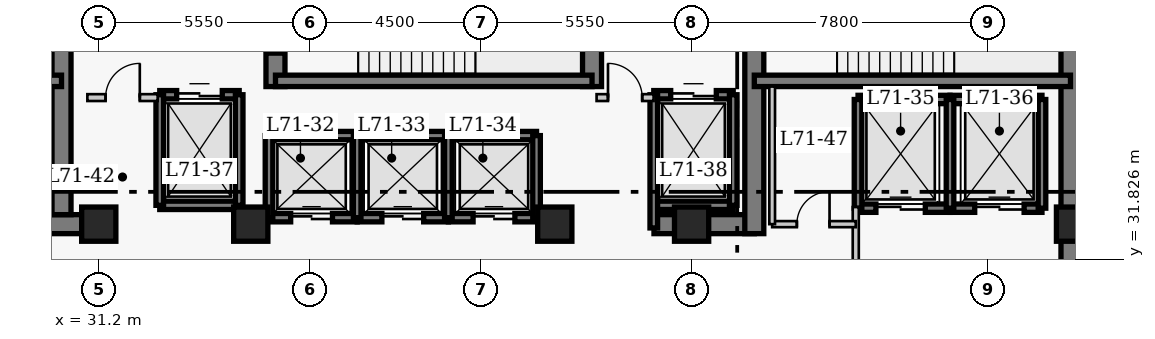
"""IFC4 building model, lengths in metres.
Left out: names, types, materials, properties, quantities, classifications, styles, units other than length and angle.
Written with IfcOpenShell. Run it as: python <this file> out.ifc"""

import sys

from ifc_helpers import new_model, si_unit, direction, frame, frame_2d, origin, origin_2d, place, context, subcontext, project, spatial, rectangle, extrude, element, fill, save


model = new_model("IFC4")
c1 = context("Model", 3, precision=1e-05, world=origin(), true_north=direction((0.0, 1.0)))
c2 = subcontext(c1, "Body", "Model", "MODEL_VIEW")
j1 = project(units=[si_unit("LENGTHUNIT", "METRE"), si_unit("PLANEANGLEUNIT", "RADIAN")], contexts=[c1])
p1 = place(None, origin())
s1 = spatial("IfcSite", under=j1, at=p1, CompositionType="ELEMENT")
p2 = place(p1, origin())
s2 = spatial("IfcBuilding", under=s1, at=p2, CompositionType="ELEMENT")
p3 = place(p2, frame((0.0, 0.0, 285.4)))
s3 = spatial("IfcBuildingStorey", under=s2, at=p3, CompositionType="ELEMENT", Elevation=285.4)
p4 = place(p3, frame((56.77, 27.05, 0.0), z_axis=(0.0, 0.0, 1.0), x_axis=(0.0, 1.0, 0.0)))
e1 = element("IfcWall", 1, at=p4, inside=s3, PredefinedType="SHEAR", context=c2, shape_type="SweptSolid", body=[
    extrude(rectangle(XDim=13.52, YDim=0.5, at=frame_2d((6.76, 0.0))), origin(), (0.0, 0.0, 1.0), 4.0),
])
p5 = place(p3, frame((28.45, 32.75, 0.0), z_axis=(0.0, 0.0, 1.0), x_axis=(1.0, 0.0, 0.0)))
e2 = element("IfcWall", 2, at=p5, inside=s3, PredefinedType="SHEAR", context=c2, shape_type="SweptSolid", body=[
    extrude(rectangle(XDim=2.4, YDim=0.5, at=frame_2d((1.2, 0.0))), origin(), (0.0, 0.0, 1.0), 4.0),
])
p6 = place(p3, frame((45.81, 32.75, 0.0), z_axis=(0.0, 0.0, 1.0), x_axis=(1.0, 0.0, 0.0)))
e3 = element("IfcWall", 3, at=p6, inside=s3, PredefinedType="SHEAR", context=c2, shape_type="SweptSolid", body=[
    extrude(rectangle(XDim=2.64, YDim=0.5, at=frame_2d((1.32, 0.0))), origin(), (0.0, 0.0, 1.0), 4.0),
])
p7 = place(p3, frame((30.22, 33.0, 0.0), z_axis=(0.0, 0.0, 1.0), x_axis=(0.0, 1.0, 0.0)))
e4 = element("IfcWall", 4, at=p7, inside=s3, PredefinedType="SHEAR", context=c2, shape_type="SweptSolid", body=[
    extrude(rectangle(XDim=7.32, YDim=0.5, at=frame_2d((3.66, 0.0))), origin(), (0.0, 0.0, 1.0), 4.0),
])
p8 = place(p3, frame((35.85, 36.37, 0.0), z_axis=(0.0, 0.0, 1.0), x_axis=(0.0, 1.0, 0.0)))
e5 = element("IfcWall", 5, at=p8, inside=s3, PredefinedType="SHEAR", context=c2, shape_type="SweptSolid", body=[
    extrude(rectangle(XDim=3.95, YDim=0.5, at=frame_2d((1.975, 0.0))), origin(), (0.0, 0.0, 1.0), 4.0),
])
p9 = place(p8, frame((0.88, 0.0, 0.0)))
e6 = element("IfcOpeningElement", 6, at=p9, cuts=e5, PredefinedType="OPENING", context=c2, shape_type="SweptSolid", body=[
    extrude(rectangle(XDim=1.1, YDim=2.15, at=frame_2d((0.55, 1.075))), frame((0.0, 0.26, 0.0), z_axis=(0.0, -1.0, 0.0), x_axis=(1.0, 0.0, 0.0)), (0.0, 0.0, 1.0), 0.52),
])
p10 = place(p3, frame((44.18, 36.37, 0.0), z_axis=(0.0, 0.0, 1.0), x_axis=(0.0, 1.0, 0.0)))
e7 = element("IfcWall", 7, at=p10, inside=s3, PredefinedType="SHEAR", context=c2, shape_type="SweptSolid", body=[
    extrude(rectangle(XDim=3.95, YDim=0.5, at=frame_2d((1.975, 0.0))), origin(), (0.0, 0.0, 1.0), 4.0),
])
p11 = place(p3, frame((48.45, 32.5, 0.0), z_axis=(0.0, 0.0, 1.0), x_axis=(0.0, 1.0, 0.0)))
e8 = element("IfcWall", 8, at=p11, inside=s3, PredefinedType="SHEAR", context=c2, shape_type="SweptSolid", body=[
    extrude(rectangle(XDim=7.82, YDim=0.5, at=frame_2d((3.91, 0.0))), origin(), (0.0, 0.0, 1.0), 4.0),
])
p12 = place(p11, frame((5.7, 0.0, 0.0)))
e9 = element("IfcOpeningElement", 9, at=p12, cuts=e8, PredefinedType="OPENING", context=c2, shape_type="SweptSolid", body=[
    extrude(rectangle(XDim=1.1, YDim=2.15, at=frame_2d((0.55, 1.075))), frame((0.0, 0.26, 0.0), z_axis=(0.0, -1.0, 0.0), x_axis=(1.0, 0.0, 0.0)), (0.0, 0.0, 1.0), 0.52),
])
p13 = place(p3, frame((21.9, 36.52, 0.0), z_axis=(0.0, 0.0, 1.0), x_axis=(1.0, 0.0, 0.0)))
e10 = element("IfcWall", 10, at=p13, inside=s3, PredefinedType="SHEAR", context=c2, shape_type="SweptSolid", body=[
    extrude(rectangle(XDim=8.32, YDim=0.3, at=frame_2d((4.16, 0.0))), origin(), (0.0, 0.0, 1.0), 4.0),
])
p14 = place(p13, frame((0.9, 0.0, 0.0)))
e11 = element("IfcOpeningElement", 11, at=p14, cuts=e10, PredefinedType="OPENING", context=c2, shape_type="SweptSolid", body=[
    extrude(rectangle(XDim=1.1, YDim=2.15, at=frame_2d((0.55, 1.075))), frame((0.0, 0.16, 0.0), z_axis=(0.0, -1.0, 0.0), x_axis=(1.0, 0.0, 0.0)), (0.0, 0.0, 1.0), 0.32),
])
p15 = place(p3, frame((35.85, 36.52, 0.0), z_axis=(0.0, 0.0, 1.0), x_axis=(1.0, 0.0, 0.0)))
e12 = element("IfcWall", 12, at=p15, inside=s3, PredefinedType="SHEAR", context=c2, shape_type="SweptSolid", body=[
    extrude(rectangle(XDim=8.33, YDim=0.3, at=frame_2d((4.165, 0.0))), origin(), (0.0, 0.0, 1.0), 4.0),
])
p16 = place(p3, frame((48.45, 36.52, 0.0), z_axis=(0.0, 0.0, 1.0), x_axis=(1.0, 0.0, 0.0)))
e13 = element("IfcWall", 13, at=p16, inside=s3, PredefinedType="SHEAR", context=c2, shape_type="SweptSolid", body=[
    extrude(rectangle(XDim=8.32, YDim=0.3, at=frame_2d((4.16, 0.0))), origin(), (0.0, 0.0, 1.0), 4.0),
])
for number, where, z_axis, x_axis in (
    (14, (31.2, 32.75, 0.0), (0.0, 0.0, 1.0), (1.0, 0.0, 0.0)),
    (15, (35.2, 32.75, 0.0), (0.0, 0.0, 1.0), (1.0, 0.0, 0.0)),
    (16, (43.2, 32.75, 0.0), (0.0, 0.0, 1.0), (1.0, 0.0, 0.0)),
    (17, (46.8, 32.75, 0.0), (0.0, 0.0, 1.0), (1.0, 0.0, 0.0)),
    (18, (56.85, 32.75, 0.0), (0.0, 0.0, 1.0), (1.0, 0.0, 0.0)),
):
    element("IfcColumn", number, at=place(p3, frame(where, z_axis=z_axis, x_axis=x_axis)), inside=s3, PredefinedType="COLUMN", context=c2, shape_type="SweptSolid", body=[
        extrude(rectangle(XDim=0.9, YDim=0.9, at=origin_2d()), origin(), (0.0, 0.0, 1.0), 4.0),
    ])
p17 = place(p3, frame((35.68, 35.08, 0.0), z_axis=(0.0, 0.0, 1.0), x_axis=(1.0, 0.0, 0.0)))
e19 = element("IfcWall", 19, at=p17, inside=s3, PredefinedType="SHEAR", context=c2, shape_type="SweptSolid", body=[
    extrude(rectangle(XDim=2.32, YDim=0.22, at=frame_2d((1.16, 0.0))), origin(), (0.0, 0.0, 1.0), 4.0),
])
p18 = place(p3, frame((35.68, 32.92, 0.0), z_axis=(0.0, 0.0, 1.0), x_axis=(1.0, 0.0, 0.0)))
e20 = element("IfcWall", 20, at=p18, inside=s3, PredefinedType="SHEAR", context=c2, shape_type="SweptSolid", body=[
    extrude(rectangle(XDim=2.32, YDim=0.22, at=frame_2d((1.16, 0.0))), origin(), (0.0, 0.0, 1.0), 4.0),
])
p19 = place(p18, frame((0.57, 0.0, 0.0)))
e21 = element("IfcOpeningElement", 21, at=p19, cuts=e20, PredefinedType="OPENING", context=c2, shape_type="SweptSolid", body=[
    extrude(rectangle(XDim=1.1, YDim=2.15, at=frame_2d((0.55, 1.075))), frame((0.0, 0.12, 0.0), z_axis=(0.0, -1.0, 0.0), x_axis=(1.0, 0.0, 0.0)), (0.0, 0.0, 1.0), 0.24),
])
p20 = place(p3, frame((35.68, 32.92, 0.0), z_axis=(0.0, 0.0, 1.0), x_axis=(0.0, 1.0, 0.0)))
e22 = element("IfcWall", 22, at=p20, inside=s3, PredefinedType="SHEAR", context=c2, shape_type="SweptSolid", body=[
    extrude(rectangle(XDim=2.16, YDim=0.2, at=frame_2d((1.08, 0.0))), origin(), (0.0, 0.0, 1.0), 4.0),
])
p21 = place(p3, frame((38.0, 35.08, 0.0), z_axis=(0.0, 0.0, 1.0), x_axis=(1.0, 0.0, 0.0)))
e23 = element("IfcWall", 23, at=p21, inside=s3, PredefinedType="SHEAR", context=c2, shape_type="SweptSolid", body=[
    extrude(rectangle(XDim=2.4, YDim=0.22, at=frame_2d((1.2, 0.0))), origin(), (0.0, 0.0, 1.0), 4.0),
])
p22 = place(p3, frame((38.0, 32.92, 0.0), z_axis=(0.0, 0.0, 1.0), x_axis=(1.0, 0.0, 0.0)))
e24 = element("IfcWall", 24, at=p22, inside=s3, PredefinedType="SHEAR", context=c2, shape_type="SweptSolid", body=[
    extrude(rectangle(XDim=2.4, YDim=0.22, at=frame_2d((1.2, 0.0))), origin(), (0.0, 0.0, 1.0), 4.0),
])
p23 = place(p22, frame((0.65, 0.0, 0.0)))
e25 = element("IfcOpeningElement", 25, at=p23, cuts=e24, PredefinedType="OPENING", context=c2, shape_type="SweptSolid", body=[
    extrude(rectangle(XDim=1.1, YDim=2.15, at=frame_2d((0.55, 1.075))), frame((0.0, 0.12, 0.0), z_axis=(0.0, -1.0, 0.0), x_axis=(1.0, 0.0, 0.0)), (0.0, 0.0, 1.0), 0.24),
])
p24 = place(p3, frame((38.0, 32.92, 0.0), z_axis=(0.0, 0.0, 1.0), x_axis=(0.0, 1.0, 0.0)))
e26 = element("IfcWall", 26, at=p24, inside=s3, PredefinedType="SHEAR", context=c2, shape_type="SweptSolid", body=[
    extrude(rectangle(XDim=2.16, YDim=0.2, at=frame_2d((1.08, 0.0))), origin(), (0.0, 0.0, 1.0), 4.0),
])
p25 = place(p3, frame((40.4, 35.08, 0.0), z_axis=(0.0, 0.0, 1.0), x_axis=(1.0, 0.0, 0.0)))
e27 = element("IfcWall", 27, at=p25, inside=s3, PredefinedType="SHEAR", context=c2, shape_type="SweptSolid", body=[
    extrude(rectangle(XDim=2.32, YDim=0.22, at=frame_2d((1.16, 0.0))), origin(), (0.0, 0.0, 1.0), 4.0),
])
p26 = place(p3, frame((40.4, 32.92, 0.0), z_axis=(0.0, 0.0, 1.0), x_axis=(1.0, 0.0, 0.0)))
e28 = element("IfcWall", 28, at=p26, inside=s3, PredefinedType="SHEAR", context=c2, shape_type="SweptSolid", body=[
    extrude(rectangle(XDim=2.32, YDim=0.22, at=frame_2d((1.16, 0.0))), origin(), (0.0, 0.0, 1.0), 4.0),
])
p27 = place(p26, frame((0.65, 0.0, 0.0)))
e29 = element("IfcOpeningElement", 29, at=p27, cuts=e28, PredefinedType="OPENING", context=c2, shape_type="SweptSolid", body=[
    extrude(rectangle(XDim=1.1, YDim=2.15, at=frame_2d((0.55, 1.075))), frame((0.0, 0.12, 0.0), z_axis=(0.0, -1.0, 0.0), x_axis=(1.0, 0.0, 0.0)), (0.0, 0.0, 1.0), 0.24),
])
for number, where, z_axis, x_axis in (
    (30, (40.4, 32.92, 0.0), (0.0, 0.0, 1.0), (0.0, 1.0, 0.0)),
    (31, (42.72, 32.92, 0.0), (0.0, 0.0, 1.0), (0.0, 1.0, 0.0)),
):
    element("IfcWall", number, at=place(p3, frame(where, z_axis=z_axis, x_axis=x_axis)), inside=s3, PredefinedType="SHEAR", context=c2, shape_type="SweptSolid", body=[
        extrude(rectangle(XDim=2.16, YDim=0.2, at=frame_2d((1.08, 0.0))), origin(), (0.0, 0.0, 1.0), 4.0),
    ])
p28 = place(p3, frame((51.18, 36.03, 0.0), z_axis=(0.0, 0.0, 1.0), x_axis=(1.0, 0.0, 0.0)))
e32 = element("IfcWall", 32, at=p28, inside=s3, PredefinedType="SHEAR", context=c2, shape_type="SweptSolid", body=[
    extrude(rectangle(XDim=2.42, YDim=0.22, at=frame_2d((1.21, 0.0))), origin(), (0.0, 0.0, 1.0), 4.0),
])
p29 = place(p3, frame((51.18, 33.17, 0.0), z_axis=(0.0, 0.0, 1.0), x_axis=(1.0, 0.0, 0.0)))
e33 = element("IfcWall", 33, at=p29, inside=s3, PredefinedType="SHEAR", context=c2, shape_type="SweptSolid", body=[
    extrude(rectangle(XDim=2.42, YDim=0.22, at=frame_2d((1.21, 0.0))), origin(), (0.0, 0.0, 1.0), 4.0),
])
p30 = place(p29, frame((0.47, 0.0, 0.0)))
e34 = element("IfcOpeningElement", 34, at=p30, cuts=e33, PredefinedType="OPENING", context=c2, shape_type="SweptSolid", body=[
    extrude(rectangle(XDim=1.3, YDim=2.15, at=frame_2d((0.65, 1.075))), frame((0.0, 0.12, 0.0), z_axis=(0.0, -1.0, 0.0), x_axis=(1.0, 0.0, 0.0)), (0.0, 0.0, 1.0), 0.24),
])
p31 = place(p3, frame((51.18, 33.17, 0.0), z_axis=(0.0, 0.0, 1.0), x_axis=(0.0, 1.0, 0.0)))
e35 = element("IfcWall", 35, at=p31, inside=s3, PredefinedType="SHEAR", context=c2, shape_type="SweptSolid", body=[
    extrude(rectangle(XDim=2.86, YDim=0.2, at=frame_2d((1.43, 0.0))), origin(), (0.0, 0.0, 1.0), 4.0),
])
p32 = place(p3, frame((53.6, 36.03, 0.0), z_axis=(0.0, 0.0, 1.0), x_axis=(1.0, 0.0, 0.0)))
e36 = element("IfcWall", 36, at=p32, inside=s3, PredefinedType="SHEAR", context=c2, shape_type="SweptSolid", body=[
    extrude(rectangle(XDim=2.42, YDim=0.22, at=frame_2d((1.21, 0.0))), origin(), (0.0, 0.0, 1.0), 4.0),
])
p33 = place(p3, frame((53.6, 33.17, 0.0), z_axis=(0.0, 0.0, 1.0), x_axis=(1.0, 0.0, 0.0)))
e37 = element("IfcWall", 37, at=p33, inside=s3, PredefinedType="SHEAR", context=c2, shape_type="SweptSolid", body=[
    extrude(rectangle(XDim=2.42, YDim=0.22, at=frame_2d((1.21, 0.0))), origin(), (0.0, 0.0, 1.0), 4.0),
])
p34 = place(p33, frame((0.65, 0.0, 0.0)))
e38 = element("IfcOpeningElement", 38, at=p34, cuts=e37, PredefinedType="OPENING", context=c2, shape_type="SweptSolid", body=[
    extrude(rectangle(XDim=1.3, YDim=2.15, at=frame_2d((0.65, 1.075))), frame((0.0, 0.12, 0.0), z_axis=(0.0, -1.0, 0.0), x_axis=(1.0, 0.0, 0.0)), (0.0, 0.0, 1.0), 0.24),
])
for number, where, z_axis, x_axis in (
    (39, (53.6, 33.17, 0.0), (0.0, 0.0, 1.0), (0.0, 1.0, 0.0)),
    (40, (56.02, 33.17, 0.0), (0.0, 0.0, 1.0), (0.0, 1.0, 0.0)),
):
    element("IfcWall", number, at=place(p3, frame(where, z_axis=z_axis, x_axis=x_axis)), inside=s3, PredefinedType="SHEAR", context=c2, shape_type="SweptSolid", body=[
        extrude(rectangle(XDim=2.86, YDim=0.2, at=frame_2d((1.43, 0.0))), origin(), (0.0, 0.0, 1.0), 4.0),
    ])
p35 = place(p3, frame((32.805, 36.155, 0.0), z_axis=(0.0, 0.0, 1.0), x_axis=(1.0, 0.0, 0.0)))
e41 = element("IfcWall", 41, at=p35, inside=s3, PredefinedType="SHEAR", context=c2, shape_type="SweptSolid", body=[
    extrude(rectangle(XDim=2.09, YDim=0.22, at=frame_2d((1.045, 0.0))), origin(), (0.0, 0.0, 1.0), 4.0),
])
p36 = place(p35, frame((0.445, 0.0, 0.0)))
e42 = element("IfcOpeningElement", 42, at=p36, cuts=e41, PredefinedType="OPENING", context=c2, shape_type="SweptSolid", body=[
    extrude(rectangle(XDim=1.2, YDim=2.15, at=frame_2d((0.6, 1.075))), frame((0.0, 0.12, 0.0), z_axis=(0.0, -1.0, 0.0), x_axis=(1.0, 0.0, 0.0)), (0.0, 0.0, 1.0), 0.24),
])
p37 = place(p3, frame((32.805, 33.245, 0.0), z_axis=(0.0, 0.0, 1.0), x_axis=(1.0, 0.0, 0.0)))
e43 = element("IfcWall", 43, at=p37, inside=s3, PredefinedType="SHEAR", context=c2, shape_type="SweptSolid", body=[
    extrude(rectangle(XDim=2.09, YDim=0.22, at=frame_2d((1.045, 0.0))), origin(), (0.0, 0.0, 1.0), 4.0),
])
for number, where, z_axis, x_axis in (
    (44, (32.805, 33.245, 0.0), (0.0, 0.0, 1.0), (0.0, 1.0, 0.0)),
    (45, (34.895, 33.245, 0.0), (0.0, 0.0, 1.0), (0.0, 1.0, 0.0)),
):
    element("IfcWall", number, at=place(p3, frame(where, z_axis=z_axis, x_axis=x_axis)), inside=s3, PredefinedType="SHEAR", context=c2, shape_type="SweptSolid", body=[
        extrude(rectangle(XDim=2.91, YDim=0.2, at=frame_2d((1.455, 0.0))), origin(), (0.0, 0.0, 1.0), 4.0),
    ])
p38 = place(p3, frame((45.805, 36.155, 0.0), z_axis=(0.0, 0.0, 1.0), x_axis=(1.0, 0.0, 0.0)))
e46 = element("IfcWall", 46, at=p38, inside=s3, PredefinedType="SHEAR", context=c2, shape_type="SweptSolid", body=[
    extrude(rectangle(XDim=2.09, YDim=0.22, at=frame_2d((1.045, 0.0))), origin(), (0.0, 0.0, 1.0), 4.0),
])
p39 = place(p38, frame((0.445, 0.0, 0.0)))
e47 = element("IfcOpeningElement", 47, at=p39, cuts=e46, PredefinedType="OPENING", context=c2, shape_type="SweptSolid", body=[
    extrude(rectangle(XDim=1.2, YDim=2.15, at=frame_2d((0.6, 1.075))), frame((0.0, 0.12, 0.0), z_axis=(0.0, -1.0, 0.0), x_axis=(1.0, 0.0, 0.0)), (0.0, 0.0, 1.0), 0.24),
])
p40 = place(p3, frame((45.805, 33.245, 0.0), z_axis=(0.0, 0.0, 1.0), x_axis=(1.0, 0.0, 0.0)))
e48 = element("IfcWall", 48, at=p40, inside=s3, PredefinedType="SHEAR", context=c2, shape_type="SweptSolid", body=[
    extrude(rectangle(XDim=2.09, YDim=0.22, at=frame_2d((1.045, 0.0))), origin(), (0.0, 0.0, 1.0), 4.0),
])
p41 = place(p3, frame((45.805, 32.65, 0.0), z_axis=(0.0, 0.0, 1.0), x_axis=(0.0, 1.0, 0.0)))
e49 = element("IfcWall", 49, at=p41, inside=s3, PredefinedType="SHEAR", context=c2, shape_type="SweptSolid", body=[
    extrude(rectangle(XDim=3.505, YDim=0.2, at=frame_2d((1.752, 0.0))), origin(), (0.0, 0.0, 1.0), 4.0),
])
p42 = place(p3, frame((47.895, 33.245, 0.0), z_axis=(0.0, 0.0, 1.0), x_axis=(0.0, 1.0, 0.0)))
e50 = element("IfcWall", 50, at=p42, inside=s3, PredefinedType="SHEAR", context=c2, shape_type="SweptSolid", body=[
    extrude(rectangle(XDim=2.91, YDim=0.2, at=frame_2d((1.455, 0.0))), origin(), (0.0, 0.0, 1.0), 4.0),
])
p43 = place(p3, frame((30.9, 36.08, 0.0), z_axis=(0.0, 0.0, 1.0), x_axis=(1.0, 0.0, 0.0)))
e51 = element("IfcWall", 51, at=p43, inside=s3, PredefinedType="PARTITIONING", context=c2, shape_type="SweptSolid", body=[
    extrude(rectangle(XDim=1.85, YDim=0.18, at=frame_2d((0.925, 0.0))), origin(), (0.0, 0.0, 1.0), 3.76),
])
p44 = place(p43, frame((0.48, 0.0, 0.0)))
e52 = element("IfcOpeningElement", 52, at=p44, cuts=e51, PredefinedType="OPENING", context=c2, shape_type="SweptSolid", body=[
    extrude(rectangle(XDim=0.9, YDim=2.15, at=frame_2d((0.45, 1.075))), frame((0.0, 0.1, 0.0), z_axis=(0.0, -1.0, 0.0), x_axis=(1.0, 0.0, 0.0)), (0.0, 0.0, 1.0), 0.2),
])
p45 = place(p3, frame((44.3, 36.08, 0.0), z_axis=(0.0, 0.0, 1.0), x_axis=(1.0, 0.0, 0.0)))
e53 = element("IfcWall", 53, at=p45, inside=s3, PredefinedType="PARTITIONING", context=c2, shape_type="SweptSolid", body=[
    extrude(rectangle(XDim=1.5, YDim=0.18, at=frame_2d((0.75, 0.0))), origin(), (0.0, 0.0, 1.0), 3.76),
])
p46 = place(p45, frame((0.3, 0.0, 0.0)))
e54 = element("IfcOpeningElement", 54, at=p46, cuts=e53, PredefinedType="OPENING", context=c2, shape_type="SweptSolid", body=[
    extrude(rectangle(XDim=0.9, YDim=2.15, at=frame_2d((0.45, 1.075))), frame((0.0, 0.1, 0.0), z_axis=(0.0, -1.0, 0.0), x_axis=(1.0, 0.0, 0.0)), (0.0, 0.0, 1.0), 0.2),
])
p47 = place(p3, frame((51.12, 29.5, 0.0), z_axis=(0.0, 0.0, 1.0), x_axis=(0.0, 1.0, 0.0)))
e55 = element("IfcWall", 55, at=p47, inside=s3, PredefinedType="PARTITIONING", context=c2, shape_type="SweptSolid", body=[
    extrude(rectangle(XDim=3.7, YDim=0.16, at=frame_2d((1.85, 0.0))), origin(), (0.0, 0.0, 1.0), 3.76),
])
p48 = place(p47, frame((0.9, 0.0, 0.0)))
e56 = element("IfcOpeningElement", 56, at=p48, cuts=e55, PredefinedType="OPENING", context=c2, shape_type="SweptSolid", body=[
    extrude(rectangle(XDim=1.1, YDim=2.15, at=frame_2d((0.55, 1.075))), frame((0.0, 0.09, 0.0), z_axis=(0.0, -1.0, 0.0), x_axis=(1.0, 0.0, 0.0)), (0.0, 0.0, 1.0), 0.18),
])
p49 = place(p3, frame((48.92, 32.75, 0.0), z_axis=(0.0, 0.0, 1.0), x_axis=(1.0, 0.0, 0.0)))
e57 = element("IfcWall", 57, at=p49, inside=s3, PredefinedType="PARTITIONING", context=c2, shape_type="SweptSolid", body=[
    extrude(rectangle(XDim=2.2, YDim=0.16, at=frame_2d((1.1, 0.0))), origin(), (0.0, 0.0, 1.0), 3.76),
])
p50 = place(p49, frame((0.65, 0.0, 0.0)))
e58 = element("IfcOpeningElement", 58, at=p50, cuts=e57, PredefinedType="OPENING", context=c2, shape_type="SweptSolid", body=[
    extrude(rectangle(XDim=0.86, YDim=2.05, at=frame_2d((0.43, 1.025))), frame((0.0, 0.09, 0.0), z_axis=(0.0, -1.0, 0.0), x_axis=(1.0, 0.0, 0.0)), (0.0, 0.0, 1.0), 0.18),
])
p51 = place(p3, frame((48.92, 32.75, 0.0), z_axis=(0.0, 0.0, 1.0), x_axis=(0.0, 1.0, 0.0)))
e59 = element("IfcWall", 59, at=p51, inside=s3, PredefinedType="PARTITIONING", context=c2, shape_type="SweptSolid", body=[
    extrude(rectangle(XDim=3.62, YDim=0.15, at=frame_2d((1.81, 0.0))), origin(), (0.0, 0.0, 1.0), 3.76),
])
p52 = place(p19, origin())
e60 = element("IfcDoor", 60, at=p52, inside=s3, OperationType="DOUBLE_DOOR_SLIDING", PredefinedType="DOOR", context=c2, shape_type="SweptSolid", body=[
    extrude(rectangle(XDim=1.1, YDim=2.15, at=frame_2d((0.55, 1.075))), frame((0.0, 0.025, 0.0), z_axis=(0.0, -1.0, 0.0), x_axis=(1.0, 0.0, 0.0)), (0.0, 0.0, 1.0), 0.05),
])
fill(e21, e60)
p53 = place(p23, origin())
e61 = element("IfcDoor", 61, at=p53, inside=s3, OperationType="DOUBLE_DOOR_SLIDING", PredefinedType="DOOR", context=c2, shape_type="SweptSolid", body=[
    extrude(rectangle(XDim=1.1, YDim=2.15, at=frame_2d((0.55, 1.075))), frame((0.0, 0.025, 0.0), z_axis=(0.0, -1.0, 0.0), x_axis=(1.0, 0.0, 0.0)), (0.0, 0.0, 1.0), 0.05),
])
fill(e25, e61)
p54 = place(p27, origin())
e62 = element("IfcDoor", 62, at=p54, inside=s3, OperationType="DOUBLE_DOOR_SLIDING", PredefinedType="DOOR", context=c2, shape_type="SweptSolid", body=[
    extrude(rectangle(XDim=1.1, YDim=2.15, at=frame_2d((0.55, 1.075))), frame((0.0, 0.025, 0.0), z_axis=(0.0, -1.0, 0.0), x_axis=(1.0, 0.0, 0.0)), (0.0, 0.0, 1.0), 0.05),
])
fill(e29, e62)
p55 = place(p30, origin())
e63 = element("IfcDoor", 63, at=p55, inside=s3, OperationType="DOUBLE_DOOR_SLIDING", PredefinedType="DOOR", context=c2, shape_type="SweptSolid", body=[
    extrude(rectangle(XDim=1.3, YDim=2.15, at=frame_2d((0.65, 1.075))), frame((0.0, 0.025, 0.0), z_axis=(0.0, -1.0, 0.0), x_axis=(1.0, 0.0, 0.0)), (0.0, 0.0, 1.0), 0.05),
])
fill(e34, e63)
p56 = place(p34, origin())
e64 = element("IfcDoor", 64, at=p56, inside=s3, OperationType="DOUBLE_DOOR_SLIDING", PredefinedType="DOOR", context=c2, shape_type="SweptSolid", body=[
    extrude(rectangle(XDim=1.3, YDim=2.15, at=frame_2d((0.65, 1.075))), frame((0.0, 0.025, 0.0), z_axis=(0.0, -1.0, 0.0), x_axis=(1.0, 0.0, 0.0)), (0.0, 0.0, 1.0), 0.05),
])
fill(e38, e64)
p57 = place(p36, origin())
e65 = element("IfcDoor", 65, at=p57, inside=s3, OperationType="DOUBLE_DOOR_SLIDING", PredefinedType="DOOR", context=c2, shape_type="SweptSolid", body=[
    extrude(rectangle(XDim=1.2, YDim=2.15, at=frame_2d((0.6, 1.075))), frame((0.0, 0.025, 0.0), z_axis=(0.0, -1.0, 0.0), x_axis=(1.0, 0.0, 0.0)), (0.0, 0.0, 1.0), 0.05),
])
fill(e42, e65)
p58 = place(p39, origin())
e66 = element("IfcDoor", 66, at=p58, inside=s3, OperationType="DOUBLE_DOOR_SLIDING", PredefinedType="DOOR", context=c2, shape_type="SweptSolid", body=[
    extrude(rectangle(XDim=1.2, YDim=2.15, at=frame_2d((0.6, 1.075))), frame((0.0, 0.025, 0.0), z_axis=(0.0, -1.0, 0.0), x_axis=(1.0, 0.0, 0.0)), (0.0, 0.0, 1.0), 0.05),
])
fill(e47, e66)
p59 = place(p44, origin())
e67 = element("IfcDoor", 67, at=p59, inside=s3, OperationType="SINGLE_SWING_RIGHT", PredefinedType="DOOR", context=c2, shape_type="SweptSolid", body=[
    extrude(rectangle(XDim=0.9, YDim=2.15, at=frame_2d((0.45, 1.075))), frame((0.0, 0.025, 0.0), z_axis=(0.0, -1.0, 0.0), x_axis=(1.0, 0.0, 0.0)), (0.0, 0.0, 1.0), 0.05),
])
fill(e52, e67)
p60 = place(p46, origin())
e68 = element("IfcDoor", 68, at=p60, inside=s3, OperationType="SINGLE_SWING_LEFT", PredefinedType="DOOR", context=c2, shape_type="SweptSolid", body=[
    extrude(rectangle(XDim=0.9, YDim=2.15, at=frame_2d((0.45, 1.075))), frame((0.0, 0.025, 0.0), z_axis=(0.0, -1.0, 0.0), x_axis=(1.0, 0.0, 0.0)), (0.0, 0.0, 1.0), 0.05),
])
fill(e54, e68)
p61 = place(p50, origin())
e69 = element("IfcDoor", 69, at=p61, inside=s3, OperationType="SINGLE_SWING_RIGHT", PredefinedType="DOOR", context=c2, shape_type="SweptSolid", body=[
    extrude(rectangle(XDim=0.86, YDim=2.05, at=frame_2d((0.43, 1.025))), frame((0.0, 0.025, 0.0), z_axis=(0.0, -1.0, 0.0), x_axis=(1.0, 0.0, 0.0)), (0.0, 0.0, 1.0), 0.05),
])
fill(e58, e69)
p62 = place(p9, origin())
e70 = element("IfcDoor", 70, at=p62, inside=s3, OperationType="SINGLE_SWING_RIGHT", PredefinedType="DOOR", context=c2, shape_type="SweptSolid", body=[
    extrude(rectangle(XDim=1.1, YDim=2.15, at=frame_2d((0.55, 1.075))), frame((0.0, 0.025, 0.0), z_axis=(0.0, -1.0, 0.0), x_axis=(1.0, 0.0, 0.0)), (0.0, 0.0, 1.0), 0.05),
])
fill(e6, e70)
save(model, sys.argv[1])
